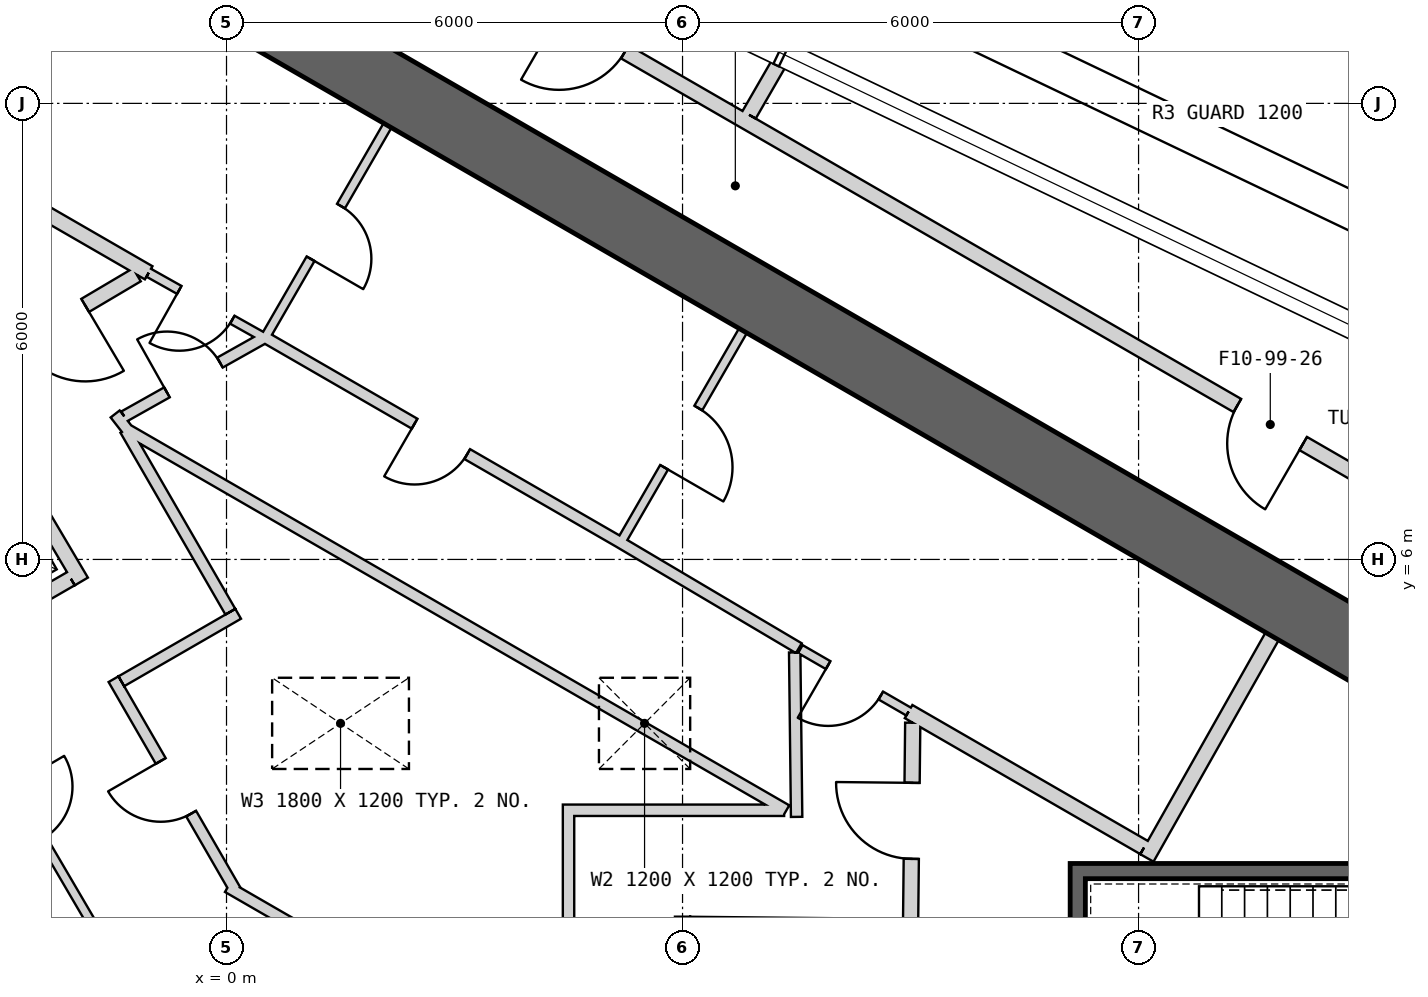
"""IFC4 building model, lengths in metres.
Left out: names, types, materials, properties, quantities, classifications, styles, units other than length and angle.
Written with IfcOpenShell. Run it as: python <this file> out.ifc"""

import sys

from ifc_helpers import new_model, si_unit, direction, frame, frame_2d, origin, origin_2d, place, context, subcontext, project, spatial, rectangle, extrude, element, fill, save


model = new_model("IFC4")
c1 = context("Model", 3, precision=1e-05, world=origin(), true_north=direction((0.0, 1.0)))
c2 = subcontext(c1, "Body", "Model", "MODEL_VIEW")
j1 = project(units=[si_unit("LENGTHUNIT", "METRE"), si_unit("PLANEANGLEUNIT", "RADIAN")], contexts=[c1])
p1 = place(None, origin())
s1 = spatial("IfcSite", under=j1, at=p1, CompositionType="ELEMENT")
p2 = place(p1, origin())
s2 = spatial("IfcBuilding", under=s1, at=p2, CompositionType="ELEMENT")
p3 = place(p2, frame((0.0, 0.0, 440.3)))
s3 = spatial("IfcBuildingStorey", under=s2, at=p3, CompositionType="ELEMENT", Elevation=440.3)
p4 = place(p3, frame((19.475, 2.208, 0.0), z_axis=(0.0, 0.0, 1.0), x_axis=(-0.866028369851, 0.499994862586, 0.0)))
e1 = element("IfcWall", 1, at=p4, inside=s3, PredefinedType="SHEAR", context=c2, shape_type="SweptSolid", body=[
    extrude(rectangle(XDim=31.523, YDim=0.9, at=frame_2d((15.762, 0.0))), origin(), (0.0, 0.0, 1.0), 4.7),
])
p5 = place(p4, frame((3.612, 0.0, 0.0)))
e2 = element("IfcOpeningElement", 2, at=p5, cuts=e1, PredefinedType="OPENING", context=c2, shape_type="SweptSolid", body=[
    extrude(rectangle(XDim=1.2, YDim=2.4, at=frame_2d((0.6, 1.2))), frame((0.0, 0.46, 0.0), z_axis=(0.0, -1.0, 0.0), x_axis=(1.0, 0.0, 0.0)), (0.0, 0.0, 1.0), 0.92),
])
p6 = place(p4, frame((26.712, 0.0, 0.0)))
e3 = element("IfcOpeningElement", 3, at=p6, cuts=e1, PredefinedType="OPENING", context=c2, shape_type="SweptSolid", body=[
    extrude(rectangle(XDim=1.2, YDim=2.4, at=frame_2d((0.6, 1.2))), frame((0.0, 0.46, 0.0), z_axis=(0.0, -1.0, 0.0), x_axis=(1.0, 0.0, 0.0)), (0.0, 0.0, 1.0), 0.92),
])
p7 = place(p3, frame((19.2, 1.9, -0.25), z_axis=(0.0, 0.0, 1.0), x_axis=(-1.0, 0.0, 0.0)))
e4 = element("IfcWall", 4, at=p7, inside=s3, PredefinedType="SHEAR", context=c2, shape_type="SweptSolid", body=[
    extrude(rectangle(XDim=8.1, YDim=0.2, at=frame_2d((4.05, 0.0))), origin(), (0.0, 0.0, 1.0), 4.95),
])
p8 = place(p3, frame((11.2, -1.8, -0.25), z_axis=(0.0, 0.0, 1.0), x_axis=(0.0, 1.0, 0.0)))
e5 = element("IfcWall", 5, at=p8, inside=s3, PredefinedType="SHEAR", context=c2, shape_type="SweptSolid", body=[
    extrude(rectangle(XDim=3.6, YDim=0.2, at=frame_2d((1.8, 0.0))), origin(), (0.0, 0.0, 1.0), 4.95),
])
p9 = place(p8, frame((1.25, 0.0, 0.25)))
e6 = element("IfcOpeningElement", 6, at=p9, cuts=e5, PredefinedType="OPENING", context=c2, shape_type="SweptSolid", body=[
    extrude(rectangle(XDim=1.1, YDim=2.1, at=frame_2d((0.55, 1.05))), frame((0.0, 0.11, 0.0), z_axis=(0.0, -1.0, 0.0), x_axis=(1.0, 0.0, 0.0)), (0.0, 0.0, 1.0), 0.22),
])
p10 = place(p3, frame((6.0, -1.1, 0.0), z_axis=(0.0, 0.0, 1.0), x_axis=(0.0, 1.0, 0.0)))
e7 = element("IfcWall", 7, at=p10, inside=s3, PredefinedType="PLUMBINGWALL", context=c2, shape_type="SweptSolid", body=[
    extrude(rectangle(XDim=2.4, YDim=0.2, at=frame_2d((1.2, 0.0))), origin(), (0.0, 0.0, 1.0), 4.7),
])
p11 = place(p3, frame((9.1, 1.169, 0.0), z_axis=(0.0, 0.0, 1.0), x_axis=(-0.99994990606, 0.010009264196, 0.0)))
e8 = element("IfcWall", 8, at=p11, inside=s3, PredefinedType="PLUMBINGWALL", context=c2, shape_type="SweptSolid", body=[
    extrude(rectangle(XDim=3.0, YDim=0.2, at=frame_2d((1.5, 0.0))), origin(), (0.0, 0.0, 1.0), 4.7),
])
p12 = place(p3, frame((-2.047, 5.746, 0.0), z_axis=(0.0, 0.0, 1.0), x_axis=(-0.86605622881, -0.499946605688, 0.0)))
e9 = element("IfcWall", 9, at=p12, inside=s3, PredefinedType="PLUMBINGWALL", context=c2, shape_type="SweptSolid", body=[
    extrude(rectangle(XDim=2.2, YDim=0.2, at=frame_2d((1.1, 0.0))), origin(), (0.0, 0.0, 1.0), 4.7),
])
p13 = place(p3, frame((-3.538, 8.465, 0.0), z_axis=(0.0, 0.0, 1.0), x_axis=(0.508616218331, -0.860993346345, 0.0)))
e10 = element("IfcWall", 10, at=p13, inside=s3, PredefinedType="PLUMBINGWALL", context=c2, shape_type="SweptSolid", body=[
    extrude(rectangle(XDim=3.2, YDim=0.2, at=frame_2d((1.6, 0.0))), origin(), (0.0, 0.0, 1.0), 4.7),
])
p14 = place(p3, frame((6.795, 9.01, 0.0), z_axis=(0.0, 0.0, 1.0), x_axis=(-0.499984717929, -0.866034226713, 0.0)))
e11 = element("IfcWall", 11, at=p14, inside=s3, PredefinedType="PARTITIONING", context=c2, shape_type="SweptSolid", body=[
    extrude(rectangle(XDim=3.25, YDim=0.12, at=frame_2d((1.625, 0.0))), origin(), (0.0, 0.0, 1.0), 4.7),
])
p15 = place(p14, frame((1.175, 0.0, 0.0)))
e12 = element("IfcOpeningElement", 12, at=p15, cuts=e11, PredefinedType="OPENING", context=c2, shape_type="SweptSolid", body=[
    extrude(rectangle(XDim=0.9, YDim=2.1, at=frame_2d((0.45, 1.05))), frame((0.0, 0.07, 0.0), z_axis=(0.0, -1.0, 0.0), x_axis=(1.0, 0.0, 0.0)), (0.0, 0.0, 1.0), 0.14),
])
p16 = place(p3, frame((12.11, 2.073, 0.0), z_axis=(0.0, 0.0, 1.0), x_axis=(0.49196600604, 0.870614408852, 0.0)))
e13 = element("IfcWall", 13, at=p16, inside=s3, PredefinedType="PARTITIONING", context=c2, shape_type="SweptSolid", body=[
    extrude(rectangle(XDim=3.35, YDim=0.2, at=frame_2d((1.675, 0.0))), origin(), (0.0, 0.0, 1.0), 4.7),
])
p17 = place(p3, frame((-4.296, 11.66, 0.0), z_axis=(0.0, 0.0, 1.0), x_axis=(0.866027389382, -0.499996560828, 0.0)))
e14 = element("IfcWall", 14, at=p17, inside=s3, PredefinedType="PARTITIONING", context=c2, shape_type="SweptSolid", body=[
    extrude(rectangle(XDim=3.778, YDim=0.2, at=frame_2d((1.889, 0.0))), origin(), (0.0, 0.0, 1.0), 4.7),
])
p18 = place(p3, frame((8.974, 3.999, 0.0), z_axis=(0.0, 0.0, 1.0), x_axis=(0.86601284211, -0.500021756827, 0.0)))
e15 = element("IfcWall", 15, at=p18, inside=s3, PredefinedType="PARTITIONING", context=c2, shape_type="SweptSolid", body=[
    extrude(rectangle(XDim=3.577, YDim=0.2, at=frame_2d((1.789, 0.0))), origin(), (0.0, 0.0, 1.0), 4.7),
])
p19 = place(p3, frame((5.159, 6.236, 0.0), z_axis=(0.0, 0.0, 1.0), x_axis=(0.860550523279, -0.509365091938, 0.0)))
e16 = element("IfcWall", 16, at=p19, inside=s3, PredefinedType="PLUMBINGWALL", context=c2, shape_type="SweptSolid", body=[
    extrude(rectangle(XDim=2.755, YDim=0.15, at=frame_2d((1.377, 0.0))), origin(), (0.0, 0.0, 1.0), 4.7),
])
p20 = place(p3, frame((7.55, 4.821, 0.0), z_axis=(0.0, 0.0, 1.0), x_axis=(0.866069384335, -0.499923815713, 0.0)))
e17 = element("IfcWall", 17, at=p20, inside=s3, PredefinedType="PARTITIONING", context=c2, shape_type="SweptSolid", body=[
    extrude(rectangle(XDim=1.644, YDim=0.12, at=frame_2d((0.822, 0.0))), origin(), (0.0, 0.0, 1.0), 4.7),
])
p21 = place(p20, frame((0.422, 0.0, 0.0)))
e18 = element("IfcOpeningElement", 18, at=p21, cuts=e17, PredefinedType="OPENING", context=c2, shape_type="SweptSolid", body=[
    extrude(rectangle(XDim=0.8, YDim=2.1, at=frame_2d((0.4, 1.05))), frame((0.0, 0.07, 0.0), z_axis=(0.0, -1.0, 0.0), x_axis=(1.0, 0.0, 0.0)), (0.0, 0.0, 1.0), 0.14),
])
p22 = place(p3, frame((2.119, 11.709, 0.0), z_axis=(0.0, 0.0, 1.0), x_axis=(-0.500017246033, -0.866015446554, 0.0)))
e19 = element("IfcWall", 19, at=p22, inside=s3, PredefinedType="PARTITIONING", context=c2, shape_type="SweptSolid", body=[
    extrude(rectangle(XDim=3.25, YDim=0.12, at=frame_2d((1.625, 0.0))), origin(), (0.0, 0.0, 1.0), 4.7),
])
p23 = place(p22, frame((1.225, 0.0, 0.0)))
e20 = element("IfcOpeningElement", 20, at=p23, cuts=e19, PredefinedType="OPENING", context=c2, shape_type="SweptSolid", body=[
    extrude(rectangle(XDim=0.8, YDim=2.1, at=frame_2d((0.4, 1.05))), frame((0.0, 0.07, 0.0), z_axis=(0.0, -1.0, 0.0), x_axis=(1.0, 0.0, 0.0)), (0.0, 0.0, 1.0), 0.14),
])
p24 = place(p3, frame((5.159, 6.236, 0.0), z_axis=(0.0, 0.0, 1.0), x_axis=(-0.866028230842, 0.499995103361, 0.0)))
e21 = element("IfcWall", 21, at=p24, inside=s3, PredefinedType="PLUMBINGWALL", context=c2, shape_type="SweptSolid", body=[
    extrude(rectangle(XDim=5.4, YDim=0.15, at=frame_2d((2.7, 0.0))), origin(), (0.0, 0.0, 1.0), 4.7),
])
p25 = place(p24, frame((2.3, 0.0, 0.0)))
e22 = element("IfcOpeningElement", 22, at=p25, cuts=e21, PredefinedType="OPENING", context=c2, shape_type="SweptSolid", body=[
    extrude(rectangle(XDim=0.8, YDim=2.1, at=frame_2d((0.4, 1.05))), frame((0.0, 0.085, 0.0), z_axis=(0.0, -1.0, 0.0), x_axis=(1.0, 0.0, 0.0)), (0.0, 0.0, 1.0), 0.17),
])
p26 = place(p3, frame((-1.024, 9.772, 0.0), z_axis=(0.0, 0.0, 1.0), x_axis=(0.871968924608, -0.489561226527, 0.0)))
e23 = element("IfcWall", 23, at=p26, inside=s3, PredefinedType="PARTITIONING", context=c2, shape_type="SweptSolid", body=[
    extrude(rectangle(XDim=1.722, YDim=0.12, at=frame_2d((0.861, 0.0))), origin(), (0.0, 0.0, 1.0), 4.7),
])
p27 = place(p26, frame((0.461, 0.0, 0.0)))
e24 = element("IfcOpeningElement", 24, at=p27, cuts=e23, PredefinedType="OPENING", context=c2, shape_type="SweptSolid", body=[
    extrude(rectangle(XDim=0.8, YDim=2.1, at=frame_2d((0.4, 1.05))), frame((0.0, 0.07, 0.0), z_axis=(0.0, -1.0, 0.0), x_axis=(1.0, 0.0, 0.0)), (0.0, 0.0, 1.0), 0.14),
])
p28 = place(p3, frame((9.001, 1.27, 0.0), z_axis=(0.0, 0.0, 1.0), x_axis=(0.010780534828, 0.999941888346, 0.0)))
e25 = element("IfcWall", 25, at=p28, inside=s3, PredefinedType="PARTITIONING", context=c2, shape_type="SweptSolid", body=[
    extrude(rectangle(XDim=2.582, YDim=0.2, at=frame_2d((1.291, 0.0))), origin(), (0.0, 0.0, 1.0), 4.7),
])
p29 = place(p28, frame((0.791, 0.0, 0.0)))
e26 = element("IfcOpeningElement", 26, at=p29, cuts=e25, PredefinedType="OPENING", context=c2, shape_type="SweptSolid", body=[
    extrude(rectangle(XDim=1.0, YDim=2.1, at=frame_2d((0.5, 1.05))), frame((0.0, 0.11, 0.0), z_axis=(0.0, -1.0, 0.0), x_axis=(1.0, 0.0, 0.0)), (0.0, 0.0, 1.0), 0.22),
])
p30 = place(p3, frame((-1.179, 9.745, 0.0), z_axis=(0.0, 0.0, 1.0), x_axis=(-0.860630814782, -0.509229418482, 0.0)))
e27 = element("IfcWall", 27, at=p30, inside=s3, PredefinedType="PARTITIONING", context=c2, shape_type="SweptSolid", body=[
    extrude(rectangle(XDim=2.582, YDim=0.2, at=frame_2d((1.291, 0.0))), origin(), (0.0, 0.0, 1.0), 4.7),
])
p31 = place(p30, frame((0.791, 0.0, 0.0)))
e28 = element("IfcOpeningElement", 28, at=p31, cuts=e27, PredefinedType="OPENING", context=c2, shape_type="SweptSolid", body=[
    extrude(rectangle(XDim=1.0, YDim=2.1, at=frame_2d((0.5, 1.05))), frame((0.0, 0.11, 0.0), z_axis=(0.0, -1.0, 0.0), x_axis=(1.0, 0.0, 0.0)), (0.0, 0.0, 1.0), 0.22),
])
p32 = place(p3, frame((-1.42, 0.612, 0.0), z_axis=(0.0, 0.0, 1.0), x_axis=(-0.505492266403, 0.862831135627, 0.0)))
e29 = element("IfcWall", 29, at=p32, inside=s3, PredefinedType="PARTITIONING", context=c2, shape_type="SweptSolid", body=[
    extrude(rectangle(XDim=4.66, YDim=0.12, at=frame_2d((2.33, 0.0))), origin(), (0.0, 0.0, 1.0), 4.7),
])
p33 = place(p32, frame((1.981, 0.0, 0.0)))
e30 = element("IfcOpeningElement", 30, at=p33, cuts=e29, PredefinedType="OPENING", context=c2, shape_type="SweptSolid", body=[
    extrude(rectangle(XDim=0.8, YDim=2.1, at=frame_2d((0.4, 1.05))), frame((0.0, 0.07, 0.0), z_axis=(0.0, -1.0, 0.0), x_axis=(1.0, 0.0, 0.0)), (0.0, 0.0, 1.0), 0.14),
])
p34 = place(p3, frame((7.367, 2.7, 0.0), z_axis=(0.0, 0.0, 1.0), x_axis=(-0.866027158831, 0.499996960157, 0.0)))
e31 = element("IfcWall", 31, at=p34, inside=s3, PredefinedType="PLUMBINGWALL", context=c2, shape_type="SweptSolid", body=[
    extrude(rectangle(XDim=10.06, YDim=0.15, at=frame_2d((5.03, 0.0))), origin(), (0.0, 0.0, 1.0), 4.7),
])
p35 = place(p3, frame((-1.465, 7.914, 0.0), z_axis=(0.0, 0.0, 1.0), x_axis=(0.613555553277, -0.789651557994, 0.0)))
e32 = element("IfcWall", 32, at=p35, inside=s3, PredefinedType="PLUMBINGWALL", context=c2, shape_type="SweptSolid", body=[
    extrude(rectangle(XDim=0.263, YDim=0.15, at=frame_2d((0.132, 0.0))), origin(), (0.0, 0.0, 1.0), 4.7),
])
p36 = place(p3, frame((0.475, 8.905, 0.0), z_axis=(0.0, 0.0, 1.0), x_axis=(-0.871859457225, -0.489756150392, 0.0)))
e33 = element("IfcWall", 33, at=p36, inside=s3, PredefinedType="PLUMBINGWALL", context=c2, shape_type="SweptSolid", body=[
    extrude(rectangle(XDim=2.089, YDim=0.15, at=frame_2d((1.044, 0.0))), origin(), (0.0, 0.0, 1.0), 4.7),
])
p37 = place(p36, frame((0.644, 0.0, 0.0)))
e34 = element("IfcOpeningElement", 34, at=p37, cuts=e33, PredefinedType="OPENING", context=c2, shape_type="SweptSolid", body=[
    extrude(rectangle(XDim=0.8, YDim=2.1, at=frame_2d((0.4, 1.05))), frame((0.0, 0.085, 0.0), z_axis=(0.0, -1.0, 0.0), x_axis=(1.0, 0.0, 0.0)), (0.0, 0.0, 1.0), 0.17),
])
p38 = place(p3, frame((7.501, 2.613, 0.0), z_axis=(0.0, 0.0, 1.0), x_axis=(-0.011734691853, 0.999931146133, 0.0)))
e35 = element("IfcWall", 35, at=p38, inside=s3, PredefinedType="PLUMBINGWALL", context=c2, shape_type="SweptSolid", body=[
    extrude(rectangle(XDim=2.164, YDim=0.15, at=frame_2d((1.082, 0.0))), origin(), (0.0, 0.0, 1.0), 4.7),
])
p39 = place(p3, frame((4.425, 2.7, 0.0), z_axis=(0.0, 0.0, 1.0), x_axis=(1.0, 0.0, 0.0)))
e36 = element("IfcWall", 36, at=p39, inside=s3, PredefinedType="PLUMBINGWALL", context=c2, shape_type="SweptSolid", body=[
    extrude(rectangle(XDim=2.912, YDim=0.15, at=frame_2d((1.456, 0.0))), origin(), (0.0, 0.0, 1.0), 4.7),
])
p40 = place(p3, frame((4.5, 0.85, 0.0), z_axis=(0.0, 0.0, 1.0), x_axis=(0.0, 1.0, 0.0)))
e37 = element("IfcWall", 37, at=p40, inside=s3, PredefinedType="PLUMBINGWALL", context=c2, shape_type="SweptSolid", body=[
    extrude(rectangle(XDim=1.775, YDim=0.15, at=frame_2d((0.887, 0.0))), origin(), (0.0, 0.0, 1.0), 4.7),
])
p41 = place(p3, frame((0.017, 1.69, 0.0), z_axis=(0.0, 0.0, 1.0), x_axis=(0.866020997002, -0.500007632694, 0.0)))
e38 = element("IfcWall", 38, at=p41, inside=s3, PredefinedType="PLUMBINGWALL", context=c2, shape_type="SweptSolid", body=[
    extrude(rectangle(XDim=1.507, YDim=0.15, at=frame_2d((0.753, 0.0))), origin(), (0.0, 0.0, 1.0), 4.7),
])
p42 = place(p3, frame((-1.486, 4.425, 0.0), z_axis=(0.0, 0.0, 1.0), x_axis=(0.499992422807, -0.866029778435, 0.0)))
e39 = element("IfcWall", 39, at=p42, inside=s3, PredefinedType="PLUMBINGWALL", context=c2, shape_type="SweptSolid", body=[
    extrude(rectangle(XDim=3.209, YDim=0.15, at=frame_2d((1.605, 0.0))), origin(), (0.0, 0.0, 1.0), 4.7),
])
p43 = place(p42, frame((1.242, 0.0, 0.0)))
e40 = element("IfcOpeningElement", 40, at=p43, cuts=e39, PredefinedType="OPENING", context=c2, shape_type="SweptSolid", body=[
    extrude(rectangle(XDim=0.8, YDim=2.1, at=frame_2d((0.4, 1.05))), frame((0.0, 0.085, 0.0), z_axis=(0.0, -1.0, 0.0), x_axis=(1.0, 0.0, 0.0)), (0.0, 0.0, 1.0), 0.17),
])
p44 = place(p3, frame((0.153, 5.285, 0.0), z_axis=(0.0, 0.0, 1.0), x_axis=(-0.866059624469, -0.499940723351, 0.0)))
e41 = element("IfcWall", 41, at=p44, inside=s3, PredefinedType="PLUMBINGWALL", context=c2, shape_type="SweptSolid", body=[
    extrude(rectangle(XDim=1.775, YDim=0.15, at=frame_2d((0.888, 0.0))), origin(), (0.0, 0.0, 1.0), 4.7),
])
p45 = place(p3, frame((-1.33, 7.704, 0.0), z_axis=(0.0, 0.0, 1.0), x_axis=(0.499980071345, -0.866036909293, 0.0)))
e42 = element("IfcWall", 42, at=p45, inside=s3, PredefinedType="PLUMBINGWALL", context=c2, shape_type="SweptSolid", body=[
    extrude(rectangle(XDim=2.762, YDim=0.15, at=frame_2d((1.381, 0.0))), origin(), (0.0, 0.0, 1.0), 4.7),
])
p46 = place(p3, frame((20.834, 3.675, 0.0), z_axis=(0.0, 0.0, 1.0), x_axis=(-0.866028536494, 0.499994573949, 0.0)))
e43 = element("IfcWall", 43, at=p46, inside=s3, PredefinedType="PARTITIONING", context=c2, shape_type="SweptSolid", body=[
    extrude(rectangle(XDim=32.411, YDim=0.2, at=frame_2d((16.206, 0.0))), origin(), (0.0, 0.0, 1.0), 4.7),
])
p47 = place(p46, frame((7.7, 0.0, 0.0)))
e44 = element("IfcOpeningElement", 44, at=p47, cuts=e43, PredefinedType="OPENING", context=c2, shape_type="SweptSolid", body=[
    extrude(rectangle(XDim=1.0, YDim=2.1, at=frame_2d((0.5, 1.05))), frame((0.0, 0.11, 0.0), z_axis=(0.0, -1.0, 0.0), x_axis=(1.0, 0.0, 0.0)), (0.0, 0.0, 1.0), 0.22),
])
p48 = place(p46, frame((18.006, 0.0, 0.0)))
e45 = element("IfcOpeningElement", 45, at=p48, cuts=e43, PredefinedType="OPENING", context=c2, shape_type="SweptSolid", body=[
    extrude(rectangle(XDim=1.0, YDim=2.1, at=frame_2d((0.5, 1.05))), frame((0.0, 0.11, 0.0), z_axis=(0.0, -1.0, 0.0), x_axis=(1.0, 0.0, 0.0)), (0.0, 0.0, 1.0), 0.22),
])
p49 = place(p3, frame((7.271, 12.534, 0.0), z_axis=(0.0, 0.0, 1.0), x_axis=(-0.500025443912, -0.866010713236, 0.0)))
e46 = element("IfcWall", 46, at=p49, inside=s3, PredefinedType="PARTITIONING", context=c2, shape_type="SweptSolid", body=[
    extrude(rectangle(XDim=0.791, YDim=0.2, at=frame_2d((0.395, 0.0))), origin(), (0.0, 0.0, 1.0), 4.7),
])
p50 = place(p2, frame((0.0, 0.0, 445.3)))
p51 = place(p50, frame((0.0, 0.0, -0.3)))
p52 = place(p51, frame((1.5, 3.843, 0.0)))
p53 = place(p52, frame((0.0, 0.0, 0.25)))
e47 = element("IfcWindow", 47, at=p53, inside=s3, PartitioningType="SINGLE_PANEL", PredefinedType="SKYLIGHT", context=c2, shape_type="SweptSolid", body=[
    extrude(rectangle(XDim=1.8, YDim=1.2, at=origin_2d()), origin(), (0.0, 0.0, 1.0), 0.05),
])
p54 = place(p51, frame((5.5, 3.843, 0.0)))
p55 = place(p54, frame((0.0, 0.0, 0.25)))
e48 = element("IfcWindow", 48, at=p55, inside=s3, PartitioningType="SINGLE_PANEL", PredefinedType="SKYLIGHT", context=c2, shape_type="SweptSolid", body=[
    extrude(rectangle(XDim=1.2, YDim=1.2, at=origin_2d()), origin(), (0.0, 0.0, 1.0), 0.05),
])
p56 = place(p29, origin())
e49 = element("IfcDoor", 49, at=p56, inside=s3, OperationType="SINGLE_SWING_RIGHT", PredefinedType="USERDEFINED", context=c2, shape_type="SweptSolid", body=[
    extrude(rectangle(XDim=1.0, YDim=2.1, at=frame_2d((0.5, 1.05))), frame((0.0, 0.025, 0.0), z_axis=(0.0, -1.0, 0.0), x_axis=(1.0, 0.0, 0.0)), (0.0, 0.0, 1.0), 0.05),
])
fill(e26, e49)
p57 = place(p31, origin())
e50 = element("IfcDoor", 50, at=p57, inside=s3, OperationType="SINGLE_SWING_LEFT", PredefinedType="USERDEFINED", context=c2, shape_type="SweptSolid", body=[
    extrude(rectangle(XDim=1.0, YDim=2.1, at=frame_2d((0.5, 1.05))), frame((0.0, 0.025, 0.0), z_axis=(0.0, -1.0, 0.0), x_axis=(1.0, 0.0, 0.0)), (0.0, 0.0, 1.0), 0.05),
])
fill(e28, e50)
p58 = place(p37, origin())
e51 = element("IfcDoor", 51, at=p58, inside=s3, OperationType="SINGLE_SWING_RIGHT", PredefinedType="USERDEFINED", context=c2, shape_type="SweptSolid", body=[
    extrude(rectangle(XDim=0.8, YDim=2.1, at=frame_2d((0.4, 1.05))), frame((0.0, 0.025, 0.0), z_axis=(0.0, -1.0, 0.0), x_axis=(1.0, 0.0, 0.0)), (0.0, 0.0, 1.0), 0.05),
])
fill(e34, e51)
p59 = place(p43, origin())
e52 = element("IfcDoor", 52, at=p59, inside=s3, OperationType="SINGLE_SWING_LEFT", PredefinedType="USERDEFINED", context=c2, shape_type="SweptSolid", body=[
    extrude(rectangle(XDim=0.8, YDim=2.1, at=frame_2d((0.4, 1.05))), frame((0.0, 0.025, 0.0), z_axis=(0.0, -1.0, 0.0), x_axis=(1.0, 0.0, 0.0)), (0.0, 0.0, 1.0), 0.05),
])
fill(e40, e52)
p60 = place(p21, origin())
e53 = element("IfcDoor", 53, at=p60, inside=s3, OperationType="SINGLE_SWING_LEFT", PredefinedType="USERDEFINED", context=c2, shape_type="SweptSolid", body=[
    extrude(rectangle(XDim=0.8, YDim=2.1, at=frame_2d((0.4, 1.05))), frame((0.0, 0.025, 0.0), z_axis=(0.0, -1.0, 0.0), x_axis=(1.0, 0.0, 0.0)), (0.0, 0.0, 1.0), 0.05),
])
fill(e18, e53)
p61 = place(p23, origin())
e54 = element("IfcDoor", 54, at=p61, inside=s3, OperationType="SINGLE_SWING_RIGHT", PredefinedType="USERDEFINED", context=c2, shape_type="SweptSolid", body=[
    extrude(rectangle(XDim=0.8, YDim=2.1, at=frame_2d((0.4, 1.05))), frame((0.0, 0.025, 0.0), z_axis=(0.0, -1.0, 0.0), x_axis=(1.0, 0.0, 0.0)), (0.0, 0.0, 1.0), 0.05),
])
fill(e20, e54)
p62 = place(p27, origin())
e55 = element("IfcDoor", 55, at=p62, inside=s3, OperationType="SINGLE_SWING_LEFT", PredefinedType="USERDEFINED", context=c2, shape_type="SweptSolid", body=[
    extrude(rectangle(XDim=0.8, YDim=2.1, at=frame_2d((0.4, 1.05))), frame((0.0, 0.025, 0.0), z_axis=(0.0, -1.0, 0.0), x_axis=(1.0, 0.0, 0.0)), (0.0, 0.0, 1.0), 0.05),
])
fill(e24, e55)
p63 = place(p25, origin())
e56 = element("IfcDoor", 56, at=p63, inside=s3, OperationType="SINGLE_SWING_RIGHT", PredefinedType="USERDEFINED", context=c2, shape_type="SweptSolid", body=[
    extrude(rectangle(XDim=0.8, YDim=2.1, at=frame_2d((0.4, 1.05))), frame((0.0, 0.025, 0.0), z_axis=(0.0, -1.0, 0.0), x_axis=(1.0, 0.0, 0.0)), (0.0, 0.0, 1.0), 0.05),
])
fill(e22, e56)
p64 = place(p47, origin())
e57 = element("IfcDoor", 57, at=p64, inside=s3, OperationType="SINGLE_SWING_LEFT", PredefinedType="USERDEFINED", context=c2, shape_type="SweptSolid", body=[
    extrude(rectangle(XDim=1.0, YDim=2.1, at=frame_2d((0.5, 1.05))), frame((0.0, 0.025, 0.0), z_axis=(0.0, -1.0, 0.0), x_axis=(1.0, 0.0, 0.0)), (0.0, 0.0, 1.0), 0.05),
])
fill(e44, e57)
p65 = place(p48, origin())
e58 = element("IfcDoor", 58, at=p65, inside=s3, OperationType="SINGLE_SWING_RIGHT", PredefinedType="USERDEFINED", context=c2, shape_type="SweptSolid", body=[
    extrude(rectangle(XDim=1.0, YDim=2.1, at=frame_2d((0.5, 1.05))), frame((0.0, 0.025, 0.0), z_axis=(0.0, -1.0, 0.0), x_axis=(1.0, 0.0, 0.0)), (0.0, 0.0, 1.0), 0.05),
])
fill(e45, e58)
p66 = place(p15, origin())
e59 = element("IfcDoor", 59, at=p66, inside=s3, OperationType="SINGLE_SWING_RIGHT", PredefinedType="NOTDEFINED", context=c2, shape_type="SweptSolid", body=[
    extrude(rectangle(XDim=0.9, YDim=2.1, at=frame_2d((0.45, 1.05))), frame((0.0, 0.025, 0.0), z_axis=(0.0, -1.0, 0.0), x_axis=(1.0, 0.0, 0.0)), (0.0, 0.0, 1.0), 0.05),
])
fill(e12, e59)
save(model, sys.argv[1])
